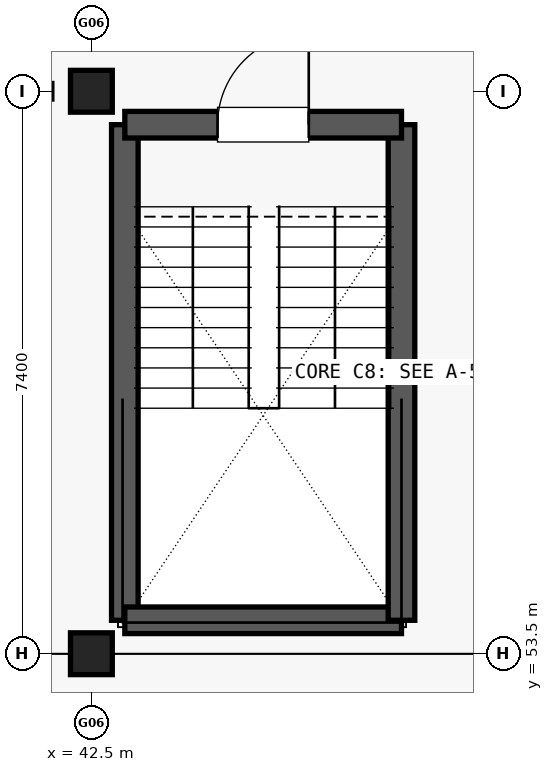
"""IFC4 building model, lengths in metres.
Left out: names, types, materials, properties, quantities, classifications, styles, units other than length and angle.
Written with IfcOpenShell. Run it as: python <this file> out.ifc"""

import sys

from ifc_helpers import new_model, si_unit, direction, frame, frame_2d, origin, origin_2d, place, context, subcontext, project, spatial, rectangle, extrude, element, fill, save


model = new_model("IFC4")
c1 = context("Model", 3, precision=1e-05, world=origin(), true_north=direction((0.0, 1.0)))
c2 = subcontext(c1, "Body", "Model", "MODEL_VIEW")
j1 = project(units=[si_unit("LENGTHUNIT", "METRE"), si_unit("PLANEANGLEUNIT", "RADIAN")], contexts=[c1])
p1 = place(None, origin())
s1 = spatial("IfcSite", under=j1, at=p1, CompositionType="ELEMENT")
p2 = place(p1, origin())
s2 = spatial("IfcBuilding", under=s1, at=p2, CompositionType="ELEMENT")
p3 = place(p2, frame((0.0, 0.0, 13.8)))
s3 = spatial("IfcBuildingStorey", under=s2, at=p3, CompositionType="ELEMENT", Elevation=13.8)
for number, where, z_axis, x_axis in (
    (1, (42.5, 53.5, 0.0), (0.0, 0.0, 1.0), (1.0, 0.0, 0.0)),
    (2, (42.5, 60.9, 0.0), (0.0, 0.0, 1.0), (1.0, 0.0, 0.0)),
):
    element("IfcColumn", number, at=place(p3, frame(where, z_axis=z_axis, x_axis=x_axis)), inside=s3, PredefinedType="COLUMN", context=c2, shape_type="SweptSolid", body=[
        extrude(rectangle(XDim=0.55, YDim=0.55, at=origin_2d()), origin(), (0.0, 0.0, 1.0), 3.38),
    ])
p4 = place(p3, frame((42.94, 53.94, 0.0), z_axis=(0.0, 0.0, 1.0), x_axis=(0.0, 1.0, 0.0)))
e3 = element("IfcWall", 3, at=p4, inside=s3, PredefinedType="SHEAR", context=c2, shape_type="SweptSolid", body=[
    extrude(rectangle(XDim=6.52, YDim=0.35, at=frame_2d((3.26, 0.0))), origin(), (0.0, 0.0, 1.0), 3.375),
])
p5 = place(p3, frame((42.94, 53.94, 0.0), z_axis=(0.0, 0.0, 1.0), x_axis=(1.0, 0.0, 0.0)))
e4 = element("IfcWall", 4, at=p5, inside=s3, PredefinedType="SHEAR", context=c2, shape_type="SweptSolid", body=[
    extrude(rectangle(XDim=3.64, YDim=0.35, at=frame_2d((1.82, 0.0))), origin(), (0.0, 0.0, 1.0), 3.375),
])
p6 = place(p3, frame((46.58, 53.94, 0.0), z_axis=(0.0, 0.0, 1.0), x_axis=(0.0, 1.0, 0.0)))
e5 = element("IfcWall", 5, at=p6, inside=s3, PredefinedType="SHEAR", context=c2, shape_type="SweptSolid", body=[
    extrude(rectangle(XDim=6.52, YDim=0.35, at=frame_2d((3.26, 0.0))), origin(), (0.0, 0.0, 1.0), 3.375),
])
p7 = place(p3, frame((42.94, 60.46, 0.0), z_axis=(0.0, 0.0, 1.0), x_axis=(1.0, 0.0, 0.0)))
e6 = element("IfcWall", 6, at=p7, inside=s3, PredefinedType="SHEAR", context=c2, shape_type="SweptSolid", body=[
    extrude(rectangle(XDim=3.64, YDim=0.35, at=frame_2d((1.82, 0.0))), origin(), (0.0, 0.0, 1.0), 3.375),
])
p8 = place(p7, frame((1.22, 0.0, 0.0)))
e7 = element("IfcOpeningElement", 7, at=p8, cuts=e6, PredefinedType="OPENING", context=c2, shape_type="SweptSolid", body=[
    extrude(rectangle(XDim=1.2, YDim=2.15, at=frame_2d((0.6, 1.075))), frame((0.0, 0.185, 0.0), z_axis=(0.0, -1.0, 0.0), x_axis=(1.0, 0.0, 0.0)), (0.0, 0.0, 1.0), 0.37),
])
p9 = place(p8, origin())
e8 = element("IfcDoor", 8, at=p9, inside=s3, OperationType="SINGLE_SWING_RIGHT", PredefinedType="DOOR", context=c2, shape_type="SweptSolid", body=[
    extrude(rectangle(XDim=1.2, YDim=2.15, at=frame_2d((0.6, 1.075))), frame((0.0, 0.025, 0.0), z_axis=(0.0, -1.0, 0.0), x_axis=(1.0, 0.0, 0.0)), (0.0, 0.0, 1.0), 0.05),
])
fill(e7, e8)
save(model, sys.argv[1])
